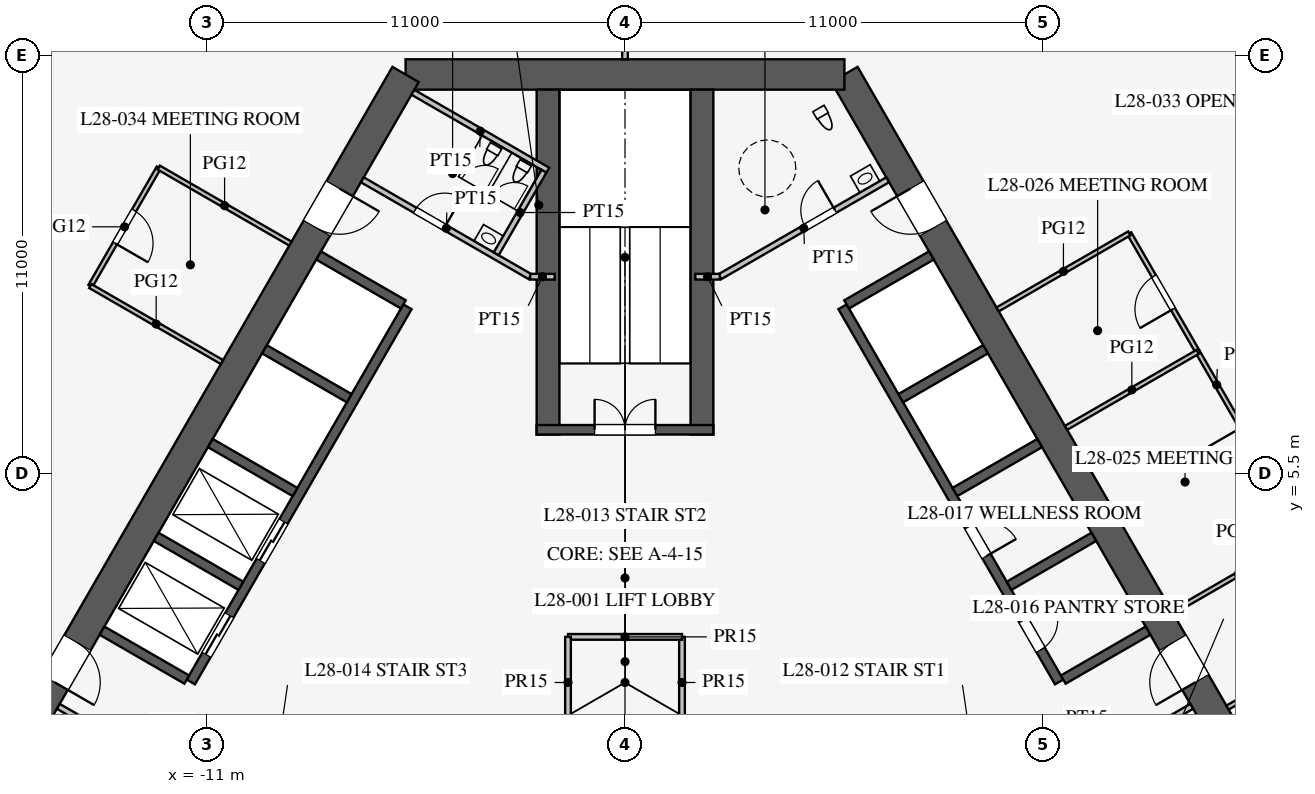
"""IFC4 building model, lengths in metres.
Left out: names, types, materials, properties, quantities, classifications, styles, units other than length and angle.
Written with IfcOpenShell. Run it as: python <this file> out.ifc"""

import sys

from ifc_helpers import new_model, si_unit, direction, frame, frame_2d, origin, place, context, subcontext, project, spatial, rectangle, extrude, element, fill, save


model = new_model("IFC4")
c1 = context("Model", 3, precision=1e-05, world=origin(), true_north=direction((0.0, 1.0)))
c2 = subcontext(c1, "Body", "Model", "MODEL_VIEW")
j1 = project(units=[si_unit("LENGTHUNIT", "METRE"), si_unit("PLANEANGLEUNIT", "RADIAN")], contexts=[c1])
p1 = place(None, origin())
s1 = spatial("IfcSite", under=j1, at=p1, CompositionType="ELEMENT")
p2 = place(p1, origin())
s2 = spatial("IfcBuilding", under=s1, at=p2, CompositionType="ELEMENT")
p3 = place(p2, frame((0.0, 0.0, 124.1)))
s3 = spatial("IfcBuildingStorey", under=s2, at=p3, CompositionType="ELEMENT", Elevation=124.1)
p4 = place(p3, frame((16.743, -3.0, 0.0), z_axis=(0.0, 0.0, 1.0), x_axis=(-0.500002442456, 0.866023993627, 0.0)))
e1 = element("IfcWall", 1, at=p4, inside=s3, PredefinedType="SHEAR", context=c2, shape_type="SweptSolid", body=[
    extrude(rectangle(XDim=21.939, YDim=0.8, at=frame_2d((10.97, 0.0))), origin(), (0.0, 0.0, 1.0), 4.2),
])
p5 = place(p4, frame((17.27, 0.0, 0.0)))
e2 = element("IfcOpeningElement", 2, at=p5, cuts=e1, PredefinedType="OPENING", context=c2, shape_type="SweptSolid", body=[
    extrude(rectangle(XDim=1.2, YDim=2.1, at=frame_2d((0.6, 1.05))), frame((0.0, 0.41, 0.0), z_axis=(0.0, -1.0, 0.0), x_axis=(1.0, 0.0, 0.0)), (0.0, 0.0, 1.0), 0.82),
])
p6 = place(p4, frame((3.47, 0.0, 0.0)))
e3 = element("IfcOpeningElement", 3, at=p6, cuts=e1, PredefinedType="OPENING", context=c2, shape_type="SweptSolid", body=[
    extrude(rectangle(XDim=1.2, YDim=2.1, at=frame_2d((0.6, 1.05))), frame((0.0, 0.41, 0.0), z_axis=(0.0, -1.0, 0.0), x_axis=(1.0, 0.0, 0.0)), (0.0, 0.0, 1.0), 0.82),
])
p7 = place(p3, frame((5.773, 16.0, 0.0), z_axis=(0.0, 0.0, 1.0), x_axis=(-1.0, 0.0, 0.0)))
e4 = element("IfcWall", 4, at=p7, inside=s3, PredefinedType="SHEAR", context=c2, shape_type="SweptSolid", body=[
    extrude(rectangle(XDim=11.547, YDim=0.8, at=frame_2d((5.773, 0.0))), origin(), (0.0, 0.0, 1.0), 4.2),
])
p8 = place(p3, frame((-5.773, 16.0, 0.0), z_axis=(0.0, 0.0, 1.0), x_axis=(-0.500002442456, -0.866023993627, 0.0)))
e5 = element("IfcWall", 5, at=p8, inside=s3, PredefinedType="SHEAR", context=c2, shape_type="SweptSolid", body=[
    extrude(rectangle(XDim=21.939, YDim=0.8, at=frame_2d((10.97, 0.0))), origin(), (0.0, 0.0, 1.0), 4.2),
])
p9 = place(p8, frame((17.27, 0.0, 0.0)))
e6 = element("IfcOpeningElement", 6, at=p9, cuts=e5, PredefinedType="OPENING", context=c2, shape_type="SweptSolid", body=[
    extrude(rectangle(XDim=1.2, YDim=2.1, at=frame_2d((0.6, 1.05))), frame((0.0, 0.41, 0.0), z_axis=(0.0, -1.0, 0.0), x_axis=(1.0, 0.0, 0.0)), (0.0, 0.0, 1.0), 0.82),
])
p10 = place(p8, frame((3.47, 0.0, 0.0)))
e7 = element("IfcOpeningElement", 7, at=p10, cuts=e5, PredefinedType="OPENING", context=c2, shape_type="SweptSolid", body=[
    extrude(rectangle(XDim=1.2, YDim=2.1, at=frame_2d((0.6, 1.05))), frame((0.0, 0.41, 0.0), z_axis=(0.0, -1.0, 0.0), x_axis=(1.0, 0.0, 0.0)), (0.0, 0.0, 1.0), 0.82),
])
p11 = place(p3, frame((11.424, 0.014, 0.0), z_axis=(0.0, 0.0, 1.0), x_axis=(-0.500001763848, 0.866024385424, 0.0)))
e8 = element("IfcWall", 8, at=p11, inside=s3, PredefinedType="SHEAR", context=c2, shape_type="SweptSolid", body=[
    extrude(rectangle(XDim=11.4, YDim=0.25, at=frame_2d((5.7, 0.0))), origin(), (0.0, 0.0, 1.0), 4.2),
])
p12 = place(p11, frame((0.975, 0.0, 0.0)))
e9 = element("IfcOpeningElement", 9, at=p12, cuts=e8, PredefinedType="OPENING", context=c2, shape_type="SweptSolid", body=[
    extrude(rectangle(XDim=0.9, YDim=2.1, at=frame_2d((0.45, 1.05))), frame((0.0, 0.135, 0.0), z_axis=(0.0, -1.0, 0.0), x_axis=(1.0, 0.0, 0.0)), (0.0, 0.0, 1.0), 0.27),
])
p13 = place(p11, frame((3.825, 0.0, 0.0)))
e10 = element("IfcOpeningElement", 10, at=p13, cuts=e8, PredefinedType="OPENING", context=c2, shape_type="SweptSolid", body=[
    extrude(rectangle(XDim=0.9, YDim=2.1, at=frame_2d((0.45, 1.05))), frame((0.0, 0.135, 0.0), z_axis=(0.0, -1.0, 0.0), x_axis=(1.0, 0.0, 0.0)), (0.0, 0.0, 1.0), 0.27),
])
for number, where, z_axis, x_axis in (
    (11, (11.532, 0.076, 0.0), (0.0, 0.0, 1.0), (0.866, 0.5, 0.0)),
    (12, (10.107, 2.544, 0.0), (0.0, 0.0, 1.0), (0.866, 0.5, 0.0)),
    (13, (8.682, 5.012, 0.0), (0.0, 0.0, 1.0), (0.866, 0.5, 0.0)),
    (14, (7.257, 7.481, 0.0), (0.0, 0.0, 1.0), (0.866, 0.5, 0.0)),
):
    element("IfcWall", number, at=place(p3, frame(where, z_axis=z_axis, x_axis=x_axis)), inside=s3, PredefinedType="SHEAR", context=c2, shape_type="SweptSolid", body=[
        extrude(rectangle(XDim=2.575, YDim=0.25, at=frame_2d((1.288, 0.0))), origin(), (0.0, 0.0, 1.0), 4.2),
    ])
p14 = place(p3, frame((5.832, 9.949, 0.0), z_axis=(0.0, 0.0, 1.0), x_axis=(0.866029291668, 0.499993265928, 0.0)))
e15 = element("IfcWall", 15, at=p14, inside=s3, PredefinedType="SHEAR", context=c2, shape_type="SweptSolid", body=[
    extrude(rectangle(XDim=2.575, YDim=0.25, at=frame_2d((1.288, 0.0))), origin(), (0.0, 0.0, 1.0), 4.2),
])
p15 = place(p3, frame((-5.724, 9.886, 0.0), z_axis=(0.0, 0.0, 1.0), x_axis=(-0.500001763848, -0.866024385424, 0.0)))
e16 = element("IfcWall", 16, at=p15, inside=s3, PredefinedType="SHEAR", context=c2, shape_type="SweptSolid", body=[
    extrude(rectangle(XDim=11.4, YDim=0.25, at=frame_2d((5.7, 0.0))), origin(), (0.0, 0.0, 1.0), 4.2),
])
p16 = place(p15, frame((6.525, 0.0, 0.0)))
e17 = element("IfcOpeningElement", 17, at=p16, cuts=e16, PredefinedType="OPENING", context=c2, shape_type="SweptSolid", body=[
    extrude(rectangle(XDim=1.2, YDim=2.2, at=frame_2d((0.6, 1.1))), frame((0.0, 0.135, 0.0), z_axis=(0.0, -1.0, 0.0), x_axis=(1.0, 0.0, 0.0)), (0.0, 0.0, 1.0), 0.27),
])
p17 = place(p15, frame((9.375, 0.0, 0.0)))
e18 = element("IfcOpeningElement", 18, at=p17, cuts=e16, PredefinedType="OPENING", context=c2, shape_type="SweptSolid", body=[
    extrude(rectangle(XDim=1.2, YDim=2.2, at=frame_2d((0.6, 1.1))), frame((0.0, 0.135, 0.0), z_axis=(0.0, -1.0, 0.0), x_axis=(1.0, 0.0, 0.0)), (0.0, 0.0, 1.0), 0.27),
])
p18 = place(p3, frame((-5.832, 9.949, 0.0), z_axis=(0.0, 0.0, 1.0), x_axis=(-0.866029291668, 0.499993265928, 0.0)))
e19 = element("IfcWall", 19, at=p18, inside=s3, PredefinedType="SHEAR", context=c2, shape_type="SweptSolid", body=[
    extrude(rectangle(XDim=2.575, YDim=0.25, at=frame_2d((1.288, 0.0))), origin(), (0.0, 0.0, 1.0), 4.2),
])
for number, where, z_axis, x_axis in (
    (20, (-7.257, 7.481, 0.0), (0.0, 0.0, 1.0), (-0.866, 0.5, 0.0)),
    (21, (-8.682, 5.012, 0.0), (0.0, 0.0, 1.0), (-0.866, 0.5, 0.0)),
    (22, (-10.107, 2.544, 0.0), (0.0, 0.0, 1.0), (-0.866, 0.5, 0.0)),
    (23, (-11.532, 0.076, 0.0), (0.0, 0.0, 1.0), (-0.866, 0.5, 0.0)),
):
    element("IfcWall", number, at=place(p3, frame(where, z_axis=z_axis, x_axis=x_axis)), inside=s3, PredefinedType="SHEAR", context=c2, shape_type="SweptSolid", body=[
        extrude(rectangle(XDim=2.575, YDim=0.25, at=frame_2d((1.288, 0.0))), origin(), (0.0, 0.0, 1.0), 4.2),
    ])
for number, where, z_axis, x_axis in (
    (24, (2.025, 6.525, 0.0), (0.0, 0.0, 1.0), (0.0, 1.0, 0.0)),
    (25, (-2.025, 6.525, 0.0), (0.0, 0.0, 1.0), (0.0, 1.0, 0.0)),
):
    element("IfcWall", number, at=place(p3, frame(where, z_axis=z_axis, x_axis=x_axis)), inside=s3, PredefinedType="SHEAR", context=c2, shape_type="SweptSolid", body=[
        extrude(rectangle(XDim=9.075, YDim=0.6, at=frame_2d((4.538, 0.0))), origin(), (0.0, 0.0, 1.0), 4.2),
    ])
p19 = place(p3, frame((2.325, 6.65, 0.0), z_axis=(0.0, 0.0, 1.0), x_axis=(-1.0, 0.0, 0.0)))
e26 = element("IfcWall", 26, at=p19, inside=s3, PredefinedType="SHEAR", context=c2, shape_type="SweptSolid", body=[
    extrude(rectangle(XDim=4.65, YDim=0.25, at=frame_2d((2.325, 0.0))), origin(), (0.0, 0.0, 1.0), 4.2),
])
p20 = place(p19, frame((1.525, 0.0, 0.0)))
e27 = element("IfcOpeningElement", 27, at=p20, cuts=e26, PredefinedType="OPENING", context=c2, shape_type="SweptSolid", body=[
    extrude(rectangle(XDim=1.6, YDim=2.1, at=frame_2d((0.8, 1.05))), frame((0.0, 0.135, 0.0), z_axis=(0.0, -1.0, 0.0), x_axis=(1.0, 0.0, 0.0)), (0.0, 0.0, 1.0), 0.27),
])
p21 = place(p3, frame((2.495, 10.678, 0.0), z_axis=(0.0, 0.0, 1.0), x_axis=(0.86602216432, 0.500005610874, 0.0)))
e28 = element("IfcWall", 28, at=p21, inside=s3, PredefinedType="PARTITIONING", context=c2, shape_type="SweptSolid", body=[
    extrude(rectangle(XDim=5.1, YDim=0.15, at=frame_2d((2.55, 0.0))), origin(), (0.0, 0.0, 1.0), 4.0),
])
p22 = place(p21, frame((2.6, 0.0, 0.0)))
e29 = element("IfcOpeningElement", 29, at=p22, cuts=e28, PredefinedType="OPENING", context=c2, shape_type="SweptSolid", body=[
    extrude(rectangle(XDim=0.9, YDim=2.1, at=frame_2d((0.45, 1.05))), frame((0.0, 0.085, 0.0), z_axis=(0.0, -1.0, 0.0), x_axis=(1.0, 0.0, 0.0)), (0.0, 0.0, 1.0), 0.17),
])
p23 = place(p3, frame((10.495, -3.178, 0.0), z_axis=(0.0, 0.0, 1.0), x_axis=(0.86602216432, 0.500005610874, 0.0)))
e30 = element("IfcWall", 30, at=p23, inside=s3, PredefinedType="PARTITIONING", context=c2, shape_type="SweptSolid", body=[
    extrude(rectangle(XDim=5.1, YDim=0.15, at=frame_2d((2.55, 0.0))), origin(), (0.0, 0.0, 1.0), 4.0),
])
p24 = place(p23, frame((2.6, 0.0, 0.0)))
e31 = element("IfcOpeningElement", 31, at=p24, cuts=e30, PredefinedType="OPENING", context=c2, shape_type="SweptSolid", body=[
    extrude(rectangle(XDim=0.9, YDim=2.1, at=frame_2d((0.45, 1.05))), frame((0.0, 0.085, 0.0), z_axis=(0.0, -1.0, 0.0), x_axis=(1.0, 0.0, 0.0)), (0.0, 0.0, 1.0), 0.17),
])
p25 = place(p3, frame((-10.495, -3.178, 0.0), z_axis=(0.0, 0.0, 1.0), x_axis=(-0.86602216432, 0.500005610874, 0.0)))
e32 = element("IfcWall", 32, at=p25, inside=s3, PredefinedType="PARTITIONING", context=c2, shape_type="SweptSolid", body=[
    extrude(rectangle(XDim=5.1, YDim=0.15, at=frame_2d((2.55, 0.0))), origin(), (0.0, 0.0, 1.0), 4.0),
])
p26 = place(p25, frame((1.3, 0.0, 0.0)))
e33 = element("IfcOpeningElement", 33, at=p26, cuts=e32, PredefinedType="OPENING", context=c2, shape_type="SweptSolid", body=[
    extrude(rectangle(XDim=0.9, YDim=2.1, at=frame_2d((0.45, 1.05))), frame((0.0, 0.085, 0.0), z_axis=(0.0, -1.0, 0.0), x_axis=(1.0, 0.0, 0.0)), (0.0, 0.0, 1.0), 0.17),
])
p27 = place(p3, frame((-2.495, 10.678, 0.0), z_axis=(0.0, 0.0, 1.0), x_axis=(-0.86602216432, 0.500005610874, 0.0)))
e34 = element("IfcWall", 34, at=p27, inside=s3, PredefinedType="PARTITIONING", context=c2, shape_type="SweptSolid", body=[
    extrude(rectangle(XDim=5.1, YDim=0.15, at=frame_2d((2.55, 0.0))), origin(), (0.0, 0.0, 1.0), 4.0),
])
p28 = place(p27, frame((2.6, 0.0, 0.0)))
e35 = element("IfcOpeningElement", 35, at=p28, cuts=e34, PredefinedType="OPENING", context=c2, shape_type="SweptSolid", body=[
    extrude(rectangle(XDim=0.9, YDim=2.1, at=frame_2d((0.45, 1.05))), frame((0.0, 0.085, 0.0), z_axis=(0.0, -1.0, 0.0), x_axis=(1.0, 0.0, 0.0)), (0.0, 0.0, 1.0), 0.17),
])
for number, where, z_axis, x_axis in (
    (36, (2.495, 10.678, 0.0), (0.0, 0.0, 1.0), (-1.0, 0.0, 0.0)),
    (37, (-2.495, 10.678, 0.0), (0.0, 0.0, 1.0), (1.0, 0.0, 0.0)),
):
    element("IfcWall", number, at=place(p3, frame(where, z_axis=z_axis, x_axis=x_axis)), inside=s3, PredefinedType="PARTITIONING", context=c2, shape_type="SweptSolid", body=[
        extrude(rectangle(XDim=0.645, YDim=0.15, at=frame_2d((0.323, 0.0))), origin(), (0.0, 0.0, 1.0), 4.0),
    ])
p29 = place(p3, frame((-2.031, 13.482, 0.0), z_axis=(0.0, 0.0, 1.0), x_axis=(-0.866050731258, 0.499956128963, 0.0)))
e38 = element("IfcWall", 38, at=p29, inside=s3, PredefinedType="PARTITIONING", context=c2, shape_type="SweptSolid", body=[
    extrude(rectangle(XDim=4.1, YDim=0.15, at=frame_2d((2.05, 0.0))), origin(), (0.0, 0.0, 1.0), 4.0),
])
p30 = place(p3, frame((-3.389, 11.281, 0.0), z_axis=(0.0, 0.0, 1.0), x_axis=(0.499989096993, 0.866031698547, 0.0)))
e39 = element("IfcWall", 39, at=p30, inside=s3, PredefinedType="PARTITIONING", context=c2, shape_type="SweptSolid", body=[
    extrude(rectangle(XDim=2.51, YDim=0.15, at=frame_2d((1.255, 0.0))), origin(), (0.0, 0.0, 1.0), 4.0),
])
p31 = place(p3, frame((1.5, -1.2, 0.0), z_axis=(0.0, 0.0, 1.0), x_axis=(0.0, 1.0, 0.0)))
e40 = element("IfcWall", 40, at=p31, inside=s3, PredefinedType="PARTITIONING", context=c2, shape_type="SweptSolid", body=[
    extrude(rectangle(XDim=2.4, YDim=0.15, at=frame_2d((1.2, 0.0))), origin(), (0.0, 0.0, 1.0), 4.0),
])
p32 = place(p3, frame((1.5, 1.2, 0.0), z_axis=(0.0, 0.0, 1.0), x_axis=(-1.0, 0.0, 0.0)))
e41 = element("IfcWall", 41, at=p32, inside=s3, PredefinedType="PARTITIONING", context=c2, shape_type="SweptSolid", body=[
    extrude(rectangle(XDim=3.0, YDim=0.15, at=frame_2d((1.5, 0.0))), origin(), (0.0, 0.0, 1.0), 4.0),
])
p33 = place(p3, frame((-1.5, 1.2, 0.0), z_axis=(0.0, 0.0, 1.0), x_axis=(0.0, -1.0, 0.0)))
e42 = element("IfcWall", 42, at=p33, inside=s3, PredefinedType="PARTITIONING", context=c2, shape_type="SweptSolid", body=[
    extrude(rectangle(XDim=2.4, YDim=0.15, at=frame_2d((1.2, 0.0))), origin(), (0.0, 0.0, 1.0), 4.0),
])
p34 = place(p3, frame((0.0, 16.4, 0.0), z_axis=(0.0, 0.0, 1.0), x_axis=(0.0, 1.0, 0.0)))
e43 = element("IfcWall", 43, at=p34, inside=s3, PredefinedType="PARTITIONING", context=c2, shape_type="SweptSolid", body=[
    extrude(rectangle(XDim=16.65, YDim=0.15, at=frame_2d((8.325, 0.0))), origin(), (0.0, 0.0, 1.0), 2.3),
])
p35 = place(p3, frame((15.069, 8.7, 0.0), z_axis=(0.0, 0.0, 1.0), x_axis=(-0.500012057535, 0.866018442252, 0.0)))
e44 = element("IfcWall", 44, at=p35, inside=s3, PredefinedType="PARTITIONING", context=c2, shape_type="SweptSolid", body=[
    extrude(rectangle(XDim=3.6, YDim=0.12, at=frame_2d((1.8, 0.0))), origin(), (0.0, 0.0, 1.0), 2.9),
])
p36 = place(p35, frame((1.3, 0.0, 0.15)))
e45 = element("IfcOpeningElement", 45, at=p36, cuts=e44, PredefinedType="OPENING", context=c2, shape_type="SweptSolid", body=[
    extrude(rectangle(XDim=1.0, YDim=2.1, at=frame_2d((0.5, 1.05))), frame((0.0, 0.07, 0.0), z_axis=(0.0, -1.0, 0.0), x_axis=(1.0, 0.0, 0.0)), (0.0, 0.0, 1.0), 0.14),
])
p37 = place(p3, frame((17.869, 3.85, 0.0), z_axis=(0.0, 0.0, 1.0), x_axis=(-0.500016814911, 0.866015695474, 0.0)))
e46 = element("IfcWall", 46, at=p37, inside=s3, PredefinedType="PARTITIONING", context=c2, shape_type="SweptSolid", body=[
    extrude(rectangle(XDim=5.6, YDim=0.12, at=frame_2d((2.8, 0.0))), origin(), (0.0, 0.0, 1.0), 2.9),
])
p38 = place(p37, frame((2.3, 0.0, 0.15)))
e47 = element("IfcOpeningElement", 47, at=p38, cuts=e46, PredefinedType="OPENING", context=c2, shape_type="SweptSolid", body=[
    extrude(rectangle(XDim=1.0, YDim=2.1, at=frame_2d((0.5, 1.05))), frame((0.0, 0.07, 0.0), z_axis=(0.0, -1.0, 0.0), x_axis=(1.0, 0.0, 0.0)), (0.0, 0.0, 1.0), 0.14),
])
for number, where, z_axis, x_axis in (
    (48, (9.805, 9.818, 0.0), (0.0, 0.0, 1.0), (0.866, 0.5, 0.0)),
    (49, (11.605, 6.7, 0.0), (0.0, 0.0, 1.0), (0.866, 0.5, 0.0)),
    (50, (14.405, 1.85, 0.0), (0.0, 0.0, 1.0), (0.866, 0.5, 0.0)),
    (51, (15.855, -0.661, 0.0), (0.0, 0.0, 1.0), (0.866, 0.5, 0.0)),
):
    element("IfcWall", number, at=place(p3, frame(where, z_axis=z_axis, x_axis=x_axis)), inside=s3, PredefinedType="PARTITIONING", context=c2, shape_type="SweptSolid", body=[
        extrude(rectangle(XDim=4.0, YDim=0.12, at=frame_2d((2.0, 0.0))), origin(), (0.0, 0.0, 1.0), 2.9),
    ])
p39 = place(p3, frame((-12.269, 13.55, 0.0), z_axis=(0.0, 0.0, 1.0), x_axis=(-0.500012057535, -0.866018442252, 0.0)))
e52 = element("IfcWall", 52, at=p39, inside=s3, PredefinedType="PARTITIONING", context=c2, shape_type="SweptSolid", body=[
    extrude(rectangle(XDim=3.6, YDim=0.12, at=frame_2d((1.8, 0.0))), origin(), (0.0, 0.0, 1.0), 2.9),
])
p40 = place(p39, frame((1.3, 0.0, 0.15)))
e53 = element("IfcOpeningElement", 53, at=p40, cuts=e52, PredefinedType="OPENING", context=c2, shape_type="SweptSolid", body=[
    extrude(rectangle(XDim=1.0, YDim=2.1, at=frame_2d((0.5, 1.05))), frame((0.0, 0.07, 0.0), z_axis=(0.0, -1.0, 0.0), x_axis=(1.0, 0.0, 0.0)), (0.0, 0.0, 1.0), 0.14),
])
for number, where, z_axis, x_axis in (
    (54, (-10.605, 8.432, 0.0), (0.0, 0.0, 1.0), (-0.866, 0.5, 0.0)),
    (55, (-8.805, 11.55, 0.0), (0.0, 0.0, 1.0), (-0.866, 0.5, 0.0)),
):
    element("IfcWall", number, at=place(p3, frame(where, z_axis=z_axis, x_axis=x_axis)), inside=s3, PredefinedType="PARTITIONING", context=c2, shape_type="SweptSolid", body=[
        extrude(rectangle(XDim=4.0, YDim=0.12, at=frame_2d((2.0, 0.0))), origin(), (0.0, 0.0, 1.0), 2.9),
    ])
p41 = place(p22, origin())
e56 = element("IfcDoor", 56, at=p41, inside=s3, OperationType="SINGLE_SWING_RIGHT", PredefinedType="DOOR", context=c2, shape_type="SweptSolid", body=[
    extrude(rectangle(XDim=0.9, YDim=2.1, at=frame_2d((0.45, 1.05))), frame((0.0, 0.025, 0.0), z_axis=(0.0, -1.0, 0.0), x_axis=(1.0, 0.0, 0.0)), (0.0, 0.0, 1.0), 0.05),
])
fill(e29, e56)
p42 = place(p28, frame((0.9, 0.0, 0.0), z_axis=(0.0, 0.0, 1.0), x_axis=(-1.0, 0.0, 0.0)))
e57 = element("IfcDoor", 57, at=p42, inside=s3, OperationType="SINGLE_SWING_RIGHT", PredefinedType="DOOR", context=c2, shape_type="SweptSolid", body=[
    extrude(rectangle(XDim=0.9, YDim=2.1, at=frame_2d((0.45, 1.05))), frame((0.0, 0.025, 0.0), z_axis=(0.0, -1.0, 0.0), x_axis=(1.0, 0.0, 0.0)), (0.0, 0.0, 1.0), 0.05),
])
fill(e35, e57)
p43 = place(p20, frame((1.6, 0.0, 0.0), z_axis=(0.0, 0.0, 1.0), x_axis=(-1.0, 0.0, 0.0)))
e58 = element("IfcDoor", 58, at=p43, inside=s3, OperationType="DOUBLE_DOOR_SINGLE_SWING", PredefinedType="DOOR", context=c2, shape_type="SweptSolid", body=[
    extrude(rectangle(XDim=1.6, YDim=2.1, at=frame_2d((0.8, 1.05))), frame((0.0, 0.025, 0.0), z_axis=(0.0, -1.0, 0.0), x_axis=(1.0, 0.0, 0.0)), (0.0, 0.0, 1.0), 0.05),
])
fill(e27, e58)
p44 = place(p5, origin())
e59 = element("IfcDoor", 59, at=p44, inside=s3, OperationType="SINGLE_SWING_RIGHT", PredefinedType="DOOR", context=c2, shape_type="SweptSolid", body=[
    extrude(rectangle(XDim=1.2, YDim=2.1, at=frame_2d((0.6, 1.05))), frame((0.0, 0.025, 0.0), z_axis=(0.0, -1.0, 0.0), x_axis=(1.0, 0.0, 0.0)), (0.0, 0.0, 1.0), 0.05),
])
fill(e2, e59)
p45 = place(p6, origin())
e60 = element("IfcDoor", 60, at=p45, inside=s3, OperationType="SINGLE_SWING_LEFT", PredefinedType="DOOR", context=c2, shape_type="SweptSolid", body=[
    extrude(rectangle(XDim=1.2, YDim=2.1, at=frame_2d((0.6, 1.05))), frame((0.0, 0.025, 0.0), z_axis=(0.0, -1.0, 0.0), x_axis=(1.0, 0.0, 0.0)), (0.0, 0.0, 1.0), 0.05),
])
fill(e3, e60)
p46 = place(p9, origin())
e61 = element("IfcDoor", 61, at=p46, inside=s3, OperationType="SINGLE_SWING_RIGHT", PredefinedType="DOOR", context=c2, shape_type="SweptSolid", body=[
    extrude(rectangle(XDim=1.2, YDim=2.1, at=frame_2d((0.6, 1.05))), frame((0.0, 0.025, 0.0), z_axis=(0.0, -1.0, 0.0), x_axis=(1.0, 0.0, 0.0)), (0.0, 0.0, 1.0), 0.05),
])
fill(e6, e61)
p47 = place(p10, origin())
e62 = element("IfcDoor", 62, at=p47, inside=s3, OperationType="SINGLE_SWING_LEFT", PredefinedType="DOOR", context=c2, shape_type="SweptSolid", body=[
    extrude(rectangle(XDim=1.2, YDim=2.1, at=frame_2d((0.6, 1.05))), frame((0.0, 0.025, 0.0), z_axis=(0.0, -1.0, 0.0), x_axis=(1.0, 0.0, 0.0)), (0.0, 0.0, 1.0), 0.05),
])
fill(e7, e62)
p48 = place(p12, frame((0.9, 0.0, 0.0), z_axis=(0.0, 0.0, 1.0), x_axis=(-1.0, 0.0, 0.0)))
e63 = element("IfcDoor", 63, at=p48, inside=s3, OperationType="SINGLE_SWING_LEFT", PredefinedType="DOOR", context=c2, shape_type="SweptSolid", body=[
    extrude(rectangle(XDim=0.9, YDim=2.1, at=frame_2d((0.45, 1.05))), frame((0.0, 0.025, 0.0), z_axis=(0.0, -1.0, 0.0), x_axis=(1.0, 0.0, 0.0)), (0.0, 0.0, 1.0), 0.05),
])
fill(e9, e63)
p49 = place(p13, frame((0.9, 0.0, 0.0), z_axis=(0.0, 0.0, 1.0), x_axis=(-1.0, 0.0, 0.0)))
e64 = element("IfcDoor", 64, at=p49, inside=s3, OperationType="SINGLE_SWING_RIGHT", PredefinedType="DOOR", context=c2, shape_type="SweptSolid", body=[
    extrude(rectangle(XDim=0.9, YDim=2.1, at=frame_2d((0.45, 1.05))), frame((0.0, 0.025, 0.0), z_axis=(0.0, -1.0, 0.0), x_axis=(1.0, 0.0, 0.0)), (0.0, 0.0, 1.0), 0.05),
])
fill(e10, e64)
p50 = place(p36, origin())
e65 = element("IfcDoor", 65, at=p50, inside=s3, OperationType="SINGLE_SWING_LEFT", PredefinedType="DOOR", context=c2, shape_type="SweptSolid", body=[
    extrude(rectangle(XDim=1.0, YDim=2.1, at=frame_2d((0.5, 1.05))), frame((0.0, 0.025, 0.0), z_axis=(0.0, -1.0, 0.0), x_axis=(1.0, 0.0, 0.0)), (0.0, 0.0, 1.0), 0.05),
])
fill(e45, e65)
p51 = place(p40, origin())
e66 = element("IfcDoor", 66, at=p51, inside=s3, OperationType="SINGLE_SWING_RIGHT", PredefinedType="DOOR", context=c2, shape_type="SweptSolid", body=[
    extrude(rectangle(XDim=1.0, YDim=2.1, at=frame_2d((0.5, 1.05))), frame((0.0, 0.025, 0.0), z_axis=(0.0, -1.0, 0.0), x_axis=(1.0, 0.0, 0.0)), (0.0, 0.0, 1.0), 0.05),
])
fill(e53, e66)
p52 = place(p16, origin())
e67 = element("IfcDoor", 67, at=p52, inside=s3, OperationType="DOUBLE_DOOR_SLIDING", PredefinedType="DOOR", context=c2, shape_type="SweptSolid", body=[
    extrude(rectangle(XDim=1.2, YDim=2.2, at=frame_2d((0.6, 1.1))), frame((0.0, 0.025, 0.0), z_axis=(0.0, -1.0, 0.0), x_axis=(1.0, 0.0, 0.0)), (0.0, 0.0, 1.0), 0.05),
])
fill(e17, e67)
p53 = place(p17, origin())
e68 = element("IfcDoor", 68, at=p53, inside=s3, OperationType="DOUBLE_DOOR_SLIDING", PredefinedType="DOOR", context=c2, shape_type="SweptSolid", body=[
    extrude(rectangle(XDim=1.2, YDim=2.2, at=frame_2d((0.6, 1.1))), frame((0.0, 0.025, 0.0), z_axis=(0.0, -1.0, 0.0), x_axis=(1.0, 0.0, 0.0)), (0.0, 0.0, 1.0), 0.05),
])
fill(e18, e68)
save(model, sys.argv[1])
